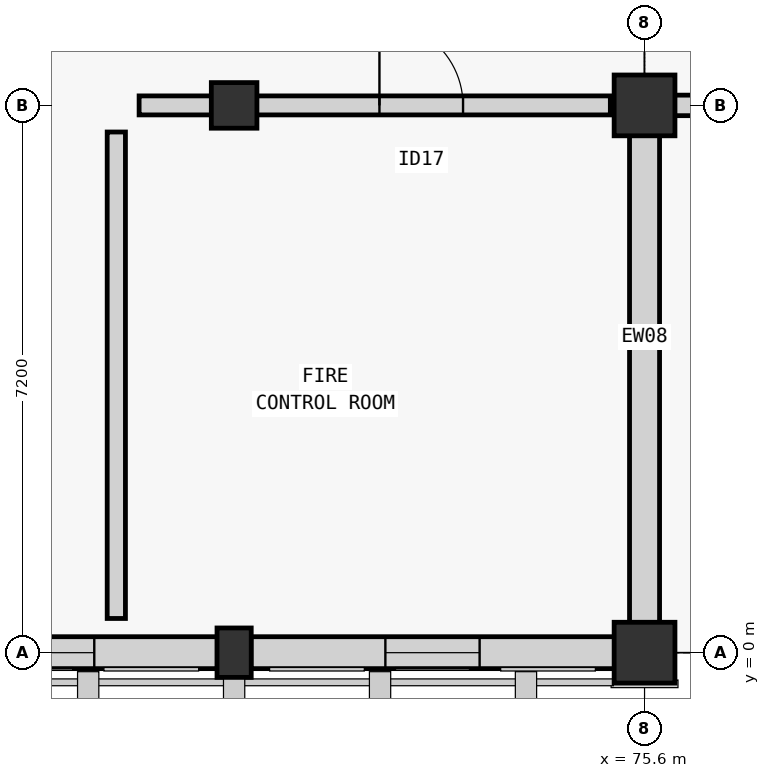
"""IFC4 building model, lengths in metres.
Left out: names, types, materials, properties, quantities, classifications, styles, units other than length and angle.
Written with IfcOpenShell. Run it as: python <this file> out.ifc"""

import sys

from ifc_helpers import new_model, si_unit, direction, frame, frame_2d, origin, origin_2d, place, context, subcontext, project, spatial, rectangle, extrude, element, fill, save


model = new_model("IFC4")
c1 = context("Model", 3, precision=1e-05, world=origin(), true_north=direction((0.0, 1.0)))
c2 = subcontext(c1, "Body", "Model", "MODEL_VIEW")
j1 = project(units=[si_unit("LENGTHUNIT", "METRE"), si_unit("PLANEANGLEUNIT", "RADIAN")], contexts=[c1])
p1 = place(None, origin())
s1 = spatial("IfcSite", under=j1, at=p1, CompositionType="ELEMENT")
p2 = place(p1, origin())
s2 = spatial("IfcBuilding", under=s1, at=p2, CompositionType="ELEMENT")
p3 = place(p2, origin())
s3 = spatial("IfcBuildingStorey", under=s2, at=p3, CompositionType="ELEMENT", Elevation=0.0)
for number, where, z_axis, x_axis in (
    (1, (75.6, 0.0, -0.3), (0.0, 0.0, 1.0), (1.0, 0.0, 0.0)),
    (2, (75.6, 7.2, -0.3), (0.0, 0.0, 1.0), (1.0, 0.0, 0.0)),
):
    element("IfcColumn", number, at=place(p3, frame(where, z_axis=z_axis, x_axis=x_axis)), inside=s3, PredefinedType="COLUMN", context=c2, shape_type="SweptSolid", body=[
        extrude(rectangle(XDim=0.8, YDim=0.8, at=origin_2d()), origin(), (0.0, 0.0, 1.0), 5.7),
    ])
p4 = place(p3, frame((70.2, 0.0, -0.3), z_axis=(0.0, 0.0, 1.0), x_axis=(1.0, 0.0, 0.0)))
e3 = element("IfcColumn", 3, at=p4, inside=s3, PredefinedType="PILASTER", context=c2, shape_type="SweptSolid", body=[
    extrude(rectangle(XDim=0.45, YDim=0.65, at=origin_2d()), origin(), (0.0, 0.0, 1.0), 5.7),
])
p5 = place(p3, frame((70.2, 7.2, -0.3), z_axis=(0.0, 0.0, 1.0), x_axis=(1.0, 0.0, 0.0)))
e4 = element("IfcColumn", 4, at=p5, inside=s3, PredefinedType="COLUMN", context=c2, shape_type="SweptSolid", body=[
    extrude(rectangle(XDim=0.6, YDim=0.6, at=origin_2d()), origin(), (0.0, 0.0, 1.0), 5.7),
])
p6 = place(p3, frame((69.979, 0.0, 0.0), z_axis=(0.0, 0.0, 1.0), x_axis=(-1.0, 0.0, 0.0)))
e5 = element("IfcWall", 5, at=p6, inside=s3, PredefinedType="STANDARD", context=c2, shape_type="SweptSolid", body=[
    extrude(rectangle(XDim=4.783, YDim=0.42, at=frame_2d((2.392, 0.0))), origin(), (0.0, 0.0, 1.0), 4.405),
])
p7 = place(p6, frame((1.619, 0.0, 2.15)))
e6 = element("IfcOpeningElement", 6, at=p7, cuts=e5, PredefinedType="OPENING", context=c2, shape_type="SweptSolid", body=[
    extrude(rectangle(XDim=1.54, YDim=0.86, at=frame_2d((0.77, 0.43))), frame((0.0, 0.21, 0.0), z_axis=(0.0, -1.0, 0.0), x_axis=(1.0, 0.0, 0.0)), (0.0, 0.0, 1.0), 0.42),
])
p8 = place(p3, frame((75.204, 0.0, 0.0), z_axis=(0.0, 0.0, 1.0), x_axis=(-1.0, 0.0, 0.0)))
e7 = element("IfcWall", 7, at=p8, inside=s3, PredefinedType="STANDARD", context=c2, shape_type="SweptSolid", body=[
    extrude(rectangle(XDim=4.783, YDim=0.42, at=frame_2d((2.392, 0.0))), origin(), (0.0, 0.0, 1.0), 4.405),
])
p9 = place(p8, frame((1.774, 0.0, 2.15)))
e8 = element("IfcOpeningElement", 8, at=p9, cuts=e7, PredefinedType="OPENING", context=c2, shape_type="SweptSolid", body=[
    extrude(rectangle(XDim=1.24, YDim=0.82, at=frame_2d((0.62, 0.41))), frame((0.0, 0.21, 0.0), z_axis=(0.0, -1.0, 0.0), x_axis=(1.0, 0.0, 0.0)), (0.0, 0.0, 1.0), 0.42),
])
p10 = place(p3, frame((75.6, 6.804, 0.0), z_axis=(0.0, 0.0, 1.0), x_axis=(0.0, -1.0, 0.0)))
e9 = element("IfcWall", 9, at=p10, inside=s3, PredefinedType="STANDARD", context=c2, shape_type="SweptSolid", body=[
    extrude(rectangle(XDim=6.408, YDim=0.395, at=frame_2d((3.204, 0.0))), origin(), (0.0, 0.0, 1.0), 4.495),
])
p11 = place(p3, frame((84.238, 7.2, 0.0), z_axis=(0.0, 0.0, 1.0), x_axis=(-1.0, 0.0, 0.0)))
e10 = element("IfcWall", 10, at=p11, inside=s3, PredefinedType="STANDARD", context=c2, shape_type="SweptSolid", body=[
    extrude(rectangle(XDim=8.242, YDim=0.27, at=frame_2d((4.121, 0.0))), origin(), (0.0, 0.0, 1.0), 4.515),
])
p12 = place(p11, frame((2.813, 0.0, 0.0)))
e11 = element("IfcOpeningElement", 11, at=p12, cuts=e10, PredefinedType="OPENING", context=c2, shape_type="SweptSolid", body=[
    extrude(rectangle(XDim=2.65, YDim=2.85, at=frame_2d((1.325, 1.425))), frame((0.0, 0.135, 0.0), z_axis=(0.0, -1.0, 0.0), x_axis=(1.0, 0.0, 0.0)), (0.0, 0.0, 1.0), 0.27),
])
p13 = place(p3, frame((68.95, 7.2, 0.0), z_axis=(0.0, 0.0, 1.0), x_axis=(1.0, 0.0, 0.0)))
e12 = element("IfcWall", 12, at=p13, inside=s3, PredefinedType="STANDARD", context=c2, shape_type="SweptSolid", body=[
    extrude(rectangle(XDim=6.2, YDim=0.25, at=frame_2d((3.1, 0.0))), origin(), (0.0, 0.0, 1.0), 4.2),
])
p14 = place(p13, frame((3.162, 0.0, 0.0)))
e13 = element("IfcOpeningElement", 13, at=p14, cuts=e12, PredefinedType="OPENING", context=c2, shape_type="SweptSolid", body=[
    extrude(rectangle(XDim=1.1, YDim=2.18, at=frame_2d((0.55, 1.09))), frame((0.0, 0.125, 0.0), z_axis=(0.0, -1.0, 0.0), x_axis=(1.0, 0.0, 0.0)), (0.0, 0.0, 1.0), 0.25),
])
p15 = place(p3, frame((68.65, 0.45, 0.0), z_axis=(0.0, 0.0, 1.0), x_axis=(0.0, 1.0, 0.0)))
e14 = element("IfcWall", 14, at=p15, inside=s3, PredefinedType="PLUMBINGWALL", context=c2, shape_type="SweptSolid", body=[
    extrude(rectangle(XDim=6.4, YDim=0.24, at=frame_2d((3.2, 0.0))), origin(), (0.0, 0.0, 1.0), 4.2),
])
p16 = place(p7, origin())
e15 = element("IfcWindow", 15, at=p16, inside=s3, PartitioningType="SINGLE_PANEL", PredefinedType="WINDOW", context=c2, shape_type="SweptSolid", body=[
    extrude(rectangle(XDim=1.54, YDim=0.86, at=frame_2d((0.77, 0.43))), frame((0.0, 0.03, 0.0), z_axis=(0.0, -1.0, 0.0), x_axis=(1.0, 0.0, 0.0)), (0.0, 0.0, 1.0), 0.06),
])
fill(e6, e15)
p17 = place(p9, origin())
e16 = element("IfcWindow", 16, at=p17, inside=s3, PartitioningType="SINGLE_PANEL", PredefinedType="WINDOW", context=c2, shape_type="SweptSolid", body=[
    extrude(rectangle(XDim=1.24, YDim=0.82, at=frame_2d((0.62, 0.41))), frame((0.0, 0.03, 0.0), z_axis=(0.0, -1.0, 0.0), x_axis=(1.0, 0.0, 0.0)), (0.0, 0.0, 1.0), 0.06),
])
fill(e8, e16)
p18 = place(p14, origin())
e17 = element("IfcDoor", 17, at=p18, inside=s3, OperationType="SINGLE_SWING_LEFT", PredefinedType="DOOR", context=c2, shape_type="SweptSolid", body=[
    extrude(rectangle(XDim=1.1, YDim=2.18, at=frame_2d((0.55, 1.09))), frame((0.0, 0.025, 0.0), z_axis=(0.0, -1.0, 0.0), x_axis=(1.0, 0.0, 0.0)), (0.0, 0.0, 1.0), 0.05),
])
fill(e13, e17)
save(model, sys.argv[1])
